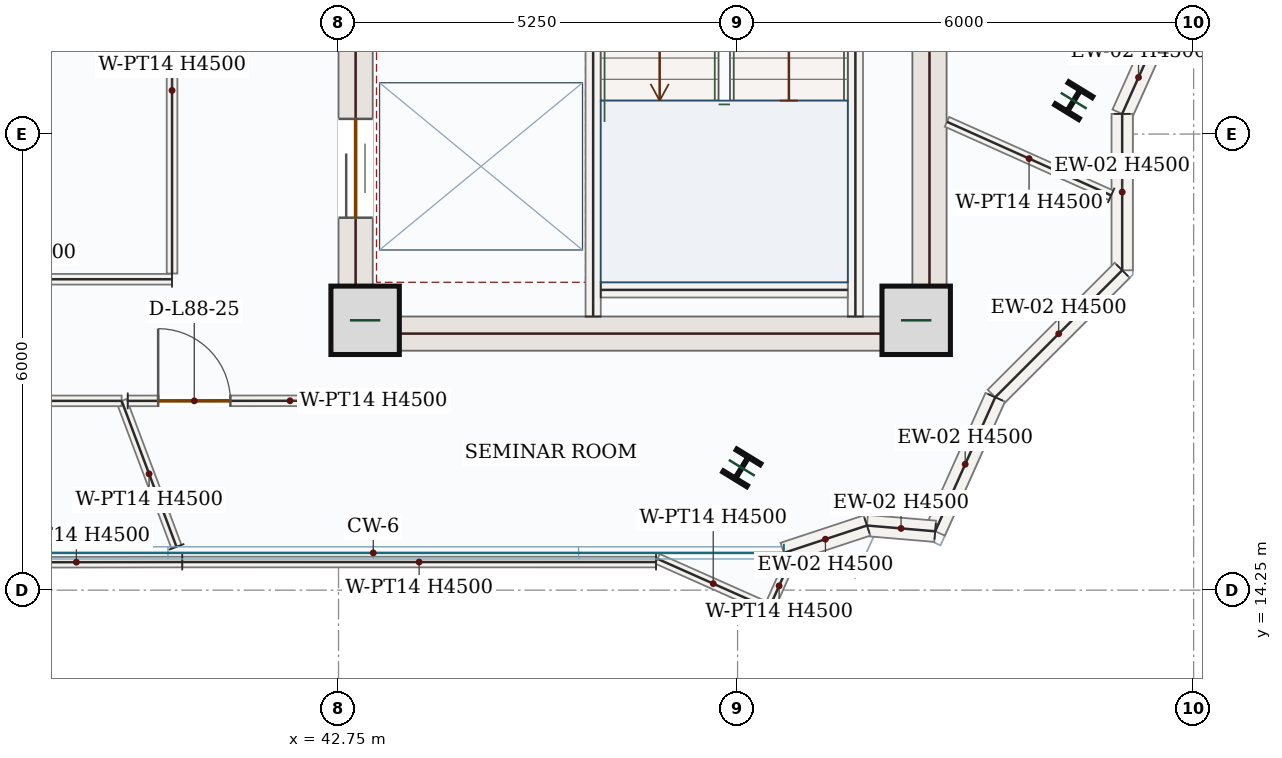
"""IFC4 building model, lengths in metres.
Left out: names, types, materials, properties, quantities, classifications, styles, units other than length and angle.
Written with IfcOpenShell. Run it as: python <this file> out.ifc"""

import sys

from ifc_helpers import new_model, si_unit, direction, frame, frame_2d, origin, origin_2d, place, context, subcontext, project, spatial, rectangle, i_section, extrude, source, transform, mapped, element, fill, save


model = new_model("IFC4")
c1 = context("Model", 3, precision=1e-05, world=origin(), true_north=direction((0.0, 1.0)))
c2 = subcontext(c1, "Body", "Model", "MODEL_VIEW")
j1 = project(units=[si_unit("LENGTHUNIT", "METRE"), si_unit("PLANEANGLEUNIT", "RADIAN")], contexts=[c1])
p1 = place(None, origin())
s1 = spatial("IfcSite", under=j1, at=p1, CompositionType="ELEMENT")
p2 = place(p1, origin())
s2 = spatial("IfcBuilding", under=s1, at=p2, CompositionType="ELEMENT")
p3 = place(p2, frame((0.0, 0.0, 361.05)))
s3 = spatial("IfcBuildingStorey", under=s2, at=p3, CompositionType="ELEMENT", Elevation=361.05)
p4 = place(p3, frame((42.975, 17.4, 0.0), z_axis=(0.0, 0.0, 1.0), x_axis=(0.0, 1.0, 0.0)))
e1 = element("IfcWall", 1, at=p4, inside=s3, PredefinedType="SHEAR", context=c2, shape_type="SweptSolid", body=[
    extrude(rectangle(XDim=8.55, YDim=0.45, at=frame_2d((4.275, 0.0))), origin(), (0.0, 0.0, 1.0), 4.5),
])
p5 = place(p4, frame((6.65, 0.0, 0.0)))
e2 = element("IfcOpeningElement", 2, at=p5, cuts=e1, PredefinedType="OPENING", context=c2, shape_type="SweptSolid", body=[
    extrude(rectangle(XDim=1.1, YDim=2.2, at=frame_2d((0.55, 1.1))), frame((0.0, 0.235, 0.0), z_axis=(0.0, -1.0, 0.0), x_axis=(1.0, 0.0, 0.0)), (0.0, 0.0, 1.0), 0.47),
])
p6 = place(p4, frame((1.75, 0.0, 0.0)))
e3 = element("IfcOpeningElement", 3, at=p6, cuts=e1, PredefinedType="OPENING", context=c2, shape_type="SweptSolid", body=[
    extrude(rectangle(XDim=1.3, YDim=2.2, at=frame_2d((0.65, 1.1))), frame((0.0, 0.235, 0.0), z_axis=(0.0, -1.0, 0.0), x_axis=(1.0, 0.0, 0.0)), (0.0, 0.0, 1.0), 0.47),
])
p7 = place(p4, frame((4.55, 0.0, 0.0)))
e4 = element("IfcOpeningElement", 4, at=p7, cuts=e1, PredefinedType="OPENING", context=c2, shape_type="SweptSolid", body=[
    extrude(rectangle(XDim=0.88, YDim=2.1, at=frame_2d((0.44, 1.05))), frame((0.0, 0.235, 0.0), z_axis=(0.0, -1.0, 0.0), x_axis=(1.0, 0.0, 0.0)), (0.0, 0.0, 1.0), 0.47),
])
m1 = source(origin(), c2, "Body", "SweptSolid", [
    extrude(rectangle(XDim=8.55, YDim=0.45, at=frame_2d((4.275, 0.0))), origin(), (0.0, 0.0, 1.0), 4.5),
])
p8 = place(p3, frame((50.525, 17.4, 0.0), z_axis=(0.0, 0.0, 1.0), x_axis=(0.0, 1.0, 0.0)))
e5 = element("IfcWall", 5, at=p8, inside=s3, PredefinedType="SHEAR", context=c2, shape_type="MappedRepresentation", body=[
    mapped(m1, transform((0.0, 0.0, 0.0), x_axis=(1.0, 0.0, 0.0), y_axis=(0.0, 1.0, 0.0), z_axis=(0.0, 0.0, 1.0), scale=1.0)),
])
m2 = source(origin(), c2, "Body", "SweptSolid", [
    extrude(rectangle(XDim=7.1, YDim=0.45, at=frame_2d((3.55, 0.0))), origin(), (0.0, 0.0, 1.0), 4.5),
])
p9 = place(p3, frame((43.2, 17.625, 0.0), z_axis=(0.0, 0.0, 1.0), x_axis=(1.0, 0.0, 0.0)))
e6 = element("IfcWall", 6, at=p9, inside=s3, PredefinedType="SHEAR", context=c2, shape_type="MappedRepresentation", body=[
    mapped(m2, transform((0.0, 0.0, 0.0), x_axis=(1.0, 0.0, 0.0), y_axis=(0.0, 1.0, 0.0), z_axis=(0.0, 0.0, 1.0), scale=1.0)),
])
m3 = source(origin(), c2, "Body", "SweptSolid", [
    extrude(rectangle(XDim=0.9, YDim=0.9, at=origin_2d()), origin(), (0.0, 0.0, 1.0), 4.8),
])
for number, where, z_axis, x_axis in (
    (7, (43.1, 17.8, 0.0), (0.0, 0.0, 1.0), (1.0, 0.0, 0.0)),
    (8, (50.35, 17.8, 0.0), (0.0, 0.0, 1.0), (1.0, 0.0, 0.0)),
):
    element("IfcColumn", number, at=place(p3, frame(where, z_axis=z_axis, x_axis=x_axis)), inside=s3, PredefinedType="COLUMN", context=c2, shape_type="MappedRepresentation", body=[
        mapped(m3, transform((0.0, 0.0, 0.0), x_axis=(1.0, 0.0, 0.0), y_axis=(0.0, 1.0, 0.0), z_axis=(0.0, 0.0, 1.0), scale=1.0)),
    ])
m4 = source(origin(), c2, "Body", "SweptSolid", [
    extrude(i_section(OverallWidth=0.369, OverallDepth=0.356, WebThickness=0.011, FlangeThickness=0.018, FilletRadius=0.018, at=origin_2d()), origin(), (0.0, 0.0, 1.0), 4.8),
])
for number, where, z_axis, x_axis in (
    (9, (48.055, 15.859, 0.0), (0.0, 0.0, 1.0), (-0.853, 0.522, 0.0)),
    (10, (52.423, 20.689, 0.0), (0.0, 0.0, 1.0), (-0.853, 0.522, 0.0)),
):
    element("IfcColumn", number, at=place(p3, frame(where, z_axis=z_axis, x_axis=x_axis)), inside=s3, PredefinedType="COLUMN", context=c2, shape_type="MappedRepresentation", body=[
        mapped(m4, transform((0.0, 0.0, 0.0), x_axis=(1.0, 0.0, 0.0), y_axis=(0.0, 1.0, 0.0), z_axis=(0.0, 0.0, 1.0), scale=1.0)),
    ])
p10 = place(p3, frame((54.656, 24.077, 0.0), z_axis=(0.0, 0.0, 1.0), x_axis=(-0.408847516138, -0.912602711232, 0.0)))
e11 = element("IfcWall", 11, at=p10, inside=s3, PredefinedType="SOLIDWALL", context=c2, shape_type="SweptSolid", body=[
    extrude(rectangle(XDim=3.902, YDim=0.28, at=frame_2d((1.951, 0.0))), origin(), (0.0, 0.0, 1.0), 4.5),
])
p11 = place(p10, frame((1.201, 0.0, 0.85)))
e12 = element("IfcOpeningElement", 12, at=p11, cuts=e11, PredefinedType="OPENING", context=c2, shape_type="SweptSolid", body=[
    extrude(rectangle(XDim=1.5, YDim=1.5, at=frame_2d((0.75, 0.75))), frame((0.0, 0.15, 0.0), z_axis=(0.0, -1.0, 0.0), x_axis=(1.0, 0.0, 0.0)), (0.0, 0.0, 1.0), 0.3),
])
m5 = source(origin(), c2, "Body", "SweptSolid", [
    extrude(rectangle(XDim=2.058, YDim=0.28, at=frame_2d((1.029, 0.0))), origin(), (0.0, 0.0, 1.0), 4.5),
])
p12 = place(p3, frame((53.06, 20.516, 0.0), z_axis=(0.0, 0.0, 1.0), x_axis=(0.0, -1.0, 0.0)))
e13 = element("IfcWall", 13, at=p12, inside=s3, PredefinedType="SOLIDWALL", context=c2, shape_type="MappedRepresentation", body=[
    mapped(m5, transform((0.0, 0.0, 0.0), x_axis=(1.0, 0.0, 0.0), y_axis=(0.0, 1.0, 0.0), z_axis=(0.0, 0.0, 1.0), scale=1.0)),
])
m6 = source(origin(), c2, "Body", "SweptSolid", [
    extrude(rectangle(XDim=2.362, YDim=0.28, at=frame_2d((1.181, 0.0))), origin(), (0.0, 0.0, 1.0), 4.5),
])
p13 = place(p3, frame((53.06, 18.458, 0.0), z_axis=(0.0, 0.0, 1.0), x_axis=(-0.707106781187, -0.707106781187, 0.0)))
e14 = element("IfcWall", 14, at=p13, inside=s3, PredefinedType="SOLIDWALL", context=c2, shape_type="MappedRepresentation", body=[
    mapped(m6, transform((0.0, 0.0, 0.0), x_axis=(1.0, 0.0, 0.0), y_axis=(0.0, 1.0, 0.0), z_axis=(0.0, 0.0, 1.0), scale=1.0)),
])
m7 = source(origin(), c2, "Body", "SweptSolid", [
    extrude(rectangle(XDim=1.932, YDim=0.28, at=frame_2d((0.966, 0.0))), origin(), (0.0, 0.0, 1.0), 4.5),
])
p14 = place(p3, frame((51.39, 16.788, 0.0), z_axis=(0.0, 0.0, 1.0), x_axis=(-0.408856367363, -0.912598745817, 0.0)))
e15 = element("IfcWall", 15, at=p14, inside=s3, PredefinedType="SOLIDWALL", context=c2, shape_type="MappedRepresentation", body=[
    mapped(m7, transform((0.0, 0.0, 0.0), x_axis=(1.0, 0.0, 0.0), y_axis=(0.0, 1.0, 0.0), z_axis=(0.0, 0.0, 1.0), scale=1.0)),
])
m8 = source(origin(), c2, "Body", "SweptSolid", [
    extrude(rectangle(XDim=0.9, YDim=0.28, at=frame_2d((0.45, 0.0))), origin(), (0.0, 0.0, 1.0), 4.5),
])
p15 = place(p3, frame((50.6, 15.024, 0.0), z_axis=(0.0, 0.0, 1.0), x_axis=(-0.996415533388, 0.084593645284, 0.0)))
e16 = element("IfcWall", 16, at=p15, inside=s3, PredefinedType="SOLIDWALL", context=c2, shape_type="MappedRepresentation", body=[
    mapped(m8, transform((0.0, 0.0, 0.0), x_axis=(1.0, 0.0, 0.0), y_axis=(0.0, 1.0, 0.0), z_axis=(0.0, 0.0, 1.0), scale=1.0)),
])
m9 = source(origin(), c2, "Body", "SweptSolid", [
    extrude(rectangle(XDim=1.151, YDim=0.28, at=frame_2d((0.575, 0.0))), origin(), (0.0, 0.0, 1.0), 4.5),
])
p16 = place(p3, frame((49.702, 15.1, 0.0), z_axis=(0.0, 0.0, 1.0), x_axis=(-0.949717622695, -0.313107708532, 0.0)))
e17 = element("IfcWall", 17, at=p16, inside=s3, PredefinedType="SOLIDWALL", context=c2, shape_type="MappedRepresentation", body=[
    mapped(m9, transform((0.0, 0.0, 0.0), x_axis=(1.0, 0.0, 0.0), y_axis=(0.0, 1.0, 0.0), z_axis=(0.0, 0.0, 1.0), scale=1.0)),
])
m10 = source(origin(), c2, "Body", "SweptSolid", [
    extrude(rectangle(XDim=7.87, YDim=0.2, at=frame_2d((3.935, 0.0))), origin(), (0.0, 0.0, 1.0), 4.5),
])
p17 = place(p3, frame((49.55, 17.85, 0.0), z_axis=(0.0, 0.0, 1.0), x_axis=(0.0, 1.0, 0.0)))
e18 = element("IfcWall", 18, at=p17, inside=s3, PredefinedType="SOLIDWALL", context=c2, shape_type="MappedRepresentation", body=[
    mapped(m10, transform((0.0, 0.0, 0.0), x_axis=(1.0, 0.0, 0.0), y_axis=(0.0, 1.0, 0.0), z_axis=(0.0, 0.0, 1.0), scale=1.0)),
])
p18 = place(p3, frame((46.1, 17.85, 0.0), z_axis=(0.0, 0.0, 1.0), x_axis=(0.0, 1.0, 0.0)))
e19 = element("IfcWall", 19, at=p18, inside=s3, PredefinedType="SOLIDWALL", context=c2, shape_type="SweptSolid", body=[
    extrude(rectangle(XDim=8.0, YDim=0.2, at=frame_2d((4.0, 0.0))), origin(), (0.0, 0.0, 1.0), 4.5),
])
p19 = place(p18, frame((6.3, 0.0, 0.0)))
e20 = element("IfcOpeningElement", 20, at=p19, cuts=e19, PredefinedType="OPENING", context=c2, shape_type="SweptSolid", body=[
    extrude(rectangle(XDim=1.05, YDim=2.15, at=frame_2d((0.525, 1.075))), frame((0.0, 0.11, 0.0), z_axis=(0.0, -1.0, 0.0), x_axis=(1.0, 0.0, 0.0)), (0.0, 0.0, 1.0), 0.22),
])
m11 = source(origin(), c2, "Body", "SweptSolid", [
    extrude(rectangle(XDim=3.25, YDim=0.2, at=frame_2d((1.625, 0.0))), origin(), (0.0, 0.0, 1.0), 4.5),
])
p20 = place(p3, frame((46.2, 18.2, 0.0), z_axis=(0.0, 0.0, 1.0), x_axis=(1.0, 0.0, 0.0)))
e21 = element("IfcWall", 21, at=p20, inside=s3, PredefinedType="SOLIDWALL", context=c2, shape_type="MappedRepresentation", body=[
    mapped(m11, transform((0.0, 0.0, 0.0), x_axis=(1.0, 0.0, 0.0), y_axis=(0.0, 1.0, 0.0), z_axis=(0.0, 0.0, 1.0), scale=1.0)),
])
m12 = source(origin(), c2, "Body", "SweptSolid", [
    extrude(rectangle(XDim=2.367, YDim=0.14, at=frame_2d((1.184, 0.0))), origin(), (0.0, 0.0, 1.0), 4.5),
])
p21 = place(p3, frame((52.915, 19.444, 0.0), z_axis=(0.0, 0.0, 1.0), x_axis=(-0.912599576991, 0.408854512115, 0.0)))
e22 = element("IfcWall", 22, at=p21, inside=s3, PredefinedType="PARTITIONING", context=c2, shape_type="MappedRepresentation", body=[
    mapped(m12, transform((0.0, 0.0, 0.0), x_axis=(1.0, 0.0, 0.0), y_axis=(0.0, 1.0, 0.0), z_axis=(0.0, 0.0, 1.0), scale=1.0)),
])
m13 = source(origin(), c2, "Body", "SweptSolid", [
    extrude(rectangle(XDim=2.051, YDim=0.14, at=frame_2d((1.025, 0.0))), origin(), (0.0, 0.0, 1.0), 4.5),
])
p22 = place(p3, frame((40.618, 14.82, 0.0), z_axis=(0.0, 0.0, 1.0), x_axis=(-0.35174952174, 0.936094158702, 0.0)))
e23 = element("IfcWall", 23, at=p22, inside=s3, PredefinedType="PARTITIONING", context=c2, shape_type="MappedRepresentation", body=[
    mapped(m13, transform((0.0, 0.0, 0.0), x_axis=(1.0, 0.0, 0.0), y_axis=(0.0, 1.0, 0.0), z_axis=(0.0, 0.0, 1.0), scale=1.0)),
])
p23 = place(p3, frame((39.977, 16.74, 0.0), z_axis=(0.0, 0.0, 1.0), x_axis=(0.999999902865, 0.000440761593, 0.0)))
e24 = element("IfcWall", 24, at=p23, inside=s3, PredefinedType="PARTITIONING", context=c2, shape_type="SweptSolid", body=[
    extrude(rectangle(XDim=2.77, YDim=0.14, at=frame_2d((1.385, 0.0))), origin(), (0.0, 0.0, 1.0), 4.5),
])
p24 = place(p23, frame((0.4, 0.0, 0.0)))
e25 = element("IfcOpeningElement", 25, at=p24, cuts=e24, PredefinedType="OPENING", context=c2, shape_type="SweptSolid", body=[
    extrude(rectangle(XDim=0.95, YDim=2.15, at=frame_2d((0.475, 1.075))), frame((0.0, 0.08, 0.0), z_axis=(0.0, -1.0, 0.0), x_axis=(1.0, 0.0, 0.0)), (0.0, 0.0, 1.0), 0.16),
])
m14 = source(origin(), c2, "Body", "SweptSolid", [
    extrude(rectangle(XDim=0.65, YDim=0.14, at=frame_2d((0.325, 0.0))), origin(), (0.0, 0.0, 1.0), 4.5),
])
p25 = place(p3, frame((48.679, 14.603, 0.0), z_axis=(0.0, 0.0, 1.0), x_axis=(-0.40881875169, -0.912615597208, 0.0)))
e26 = element("IfcWall", 26, at=p25, inside=s3, PredefinedType="PARTITIONING", context=c2, shape_type="MappedRepresentation", body=[
    mapped(m14, transform((0.0, 0.0, 0.0), x_axis=(1.0, 0.0, 0.0), y_axis=(0.0, 1.0, 0.0), z_axis=(0.0, 0.0, 1.0), scale=1.0)),
])
m15 = source(origin(), c2, "Body", "SweptSolid", [
    extrude(rectangle(XDim=1.606, YDim=0.14, at=frame_2d((0.803, 0.0))), origin(), (0.0, 0.0, 1.0), 4.5),
])
p26 = place(p3, frame((48.414, 14.009, 0.0), z_axis=(0.0, 0.0, 1.0), x_axis=(-0.913673598799, 0.406448711227, 0.0)))
e27 = element("IfcWall", 27, at=p26, inside=s3, PredefinedType="PARTITIONING", context=c2, shape_type="MappedRepresentation", body=[
    mapped(m15, transform((0.0, 0.0, 0.0), x_axis=(1.0, 0.0, 0.0), y_axis=(0.0, 1.0, 0.0), z_axis=(0.0, 0.0, 1.0), scale=1.0)),
])
m16 = source(origin(), c2, "Body", "SweptSolid", [
    extrude(rectangle(XDim=6.234, YDim=0.14, at=frame_2d((3.117, 0.0))), origin(), (0.0, 0.0, 1.0), 4.5),
])
p27 = place(p3, frame((46.927, 14.62, 0.0), z_axis=(0.0, 0.0, 1.0), x_axis=(-0.999999996932, 7.8330004e-05, 0.0)))
e28 = element("IfcWall", 28, at=p27, inside=s3, PredefinedType="PARTITIONING", context=c2, shape_type="MappedRepresentation", body=[
    mapped(m16, transform((0.0, 0.0, 0.0), x_axis=(1.0, 0.0, 0.0), y_axis=(0.0, 1.0, 0.0), z_axis=(0.0, 0.0, 1.0), scale=1.0)),
])
m17 = source(origin(), c2, "Body", "SweptSolid", [
    extrude(rectangle(XDim=4.47, YDim=0.14, at=frame_2d((2.235, 0.0))), origin(), (0.0, 0.0, 1.0), 4.5),
])
p28 = place(p3, frame((40.56, 18.34, 0.0), z_axis=(0.0, 0.0, 1.0), x_axis=(-1.0, 0.0, 0.0)))
e29 = element("IfcWall", 29, at=p28, inside=s3, PredefinedType="PARTITIONING", context=c2, shape_type="MappedRepresentation", body=[
    mapped(m17, transform((0.0, 0.0, 0.0), x_axis=(1.0, 0.0, 0.0), y_axis=(0.0, 1.0, 0.0), z_axis=(0.0, 0.0, 1.0), scale=1.0)),
])
p29 = place(p3, frame((40.56, 25.735, 0.0), z_axis=(0.0, 0.0, 1.0), x_axis=(0.0, -1.0, 0.0)))
e30 = element("IfcWall", 30, at=p29, inside=s3, PredefinedType="PARTITIONING", context=c2, shape_type="SweptSolid", body=[
    extrude(rectangle(XDim=7.32, YDim=0.14, at=frame_2d((3.66, 0.0))), origin(), (0.0, 0.0, 1.0), 4.5),
])
p30 = place(p29, frame((1.401, 0.0, 0.0)))
e31 = element("IfcOpeningElement", 31, at=p30, cuts=e30, PredefinedType="OPENING", context=c2, shape_type="SweptSolid", body=[
    extrude(rectangle(XDim=0.95, YDim=2.15, at=frame_2d((0.475, 1.075))), frame((0.0, 0.08, 0.0), z_axis=(0.0, -1.0, 0.0), x_axis=(1.0, 0.0, 0.0)), (0.0, 0.0, 1.0), 0.16),
])
p31 = place(p3, frame((31.425, 16.74, 0.0), z_axis=(0.0, 0.0, 1.0), x_axis=(1.0, 0.0, 0.0)))
e32 = element("IfcWall", 32, at=p31, inside=s3, PredefinedType="PARTITIONING", context=c2, shape_type="SweptSolid", body=[
    extrude(rectangle(XDim=8.472, YDim=0.14, at=frame_2d((4.236, 0.0))), origin(), (0.0, 0.0, 1.0), 4.5),
])
p32 = place(p31, frame((3.761, 0.0, 0.0)))
e33 = element("IfcOpeningElement", 33, at=p32, cuts=e32, PredefinedType="OPENING", context=c2, shape_type="SweptSolid", body=[
    extrude(rectangle(XDim=0.95, YDim=2.15, at=frame_2d((0.475, 1.075))), frame((0.0, 0.08, 0.0), z_axis=(0.0, -1.0, 0.0), x_axis=(1.0, 0.0, 0.0)), (0.0, 0.0, 1.0), 0.16),
])
m18 = source(origin(), c2, "Body", "SweptSolid", [
    extrude(rectangle(XDim=2.785, YDim=0.14, at=frame_2d((1.393, 0.0))), origin(), (0.0, 0.0, 1.0), 4.5),
])
p33 = place(p3, frame((40.694, 14.62, 0.0), z_axis=(0.0, 0.0, 1.0), x_axis=(-0.999998755431, -0.001577699851, 0.0)))
e34 = element("IfcWall", 34, at=p33, inside=s3, PredefinedType="PARTITIONING", context=c2, shape_type="MappedRepresentation", body=[
    mapped(m18, transform((0.0, 0.0, 0.0), x_axis=(1.0, 0.0, 0.0), y_axis=(0.0, 1.0, 0.0), z_axis=(0.0, 0.0, 1.0), scale=1.0)),
])
m19 = source(origin(), c2, "Body", "SweptSolid", [
    extrude(rectangle(XDim=1.3, YDim=2.2, at=frame_2d((0.65, 1.1))), frame((0.0, 0.025, 0.0), z_axis=(0.0, -1.0, 0.0), x_axis=(1.0, 0.0, 0.0)), (0.0, 0.0, 1.0), 0.05),
])
p34 = place(p6, origin())
e35 = element("IfcDoor", 35, at=p34, inside=s3, OperationType="DOUBLE_DOOR_SLIDING", PredefinedType="DOOR", context=c2, shape_type="MappedRepresentation", body=[
    mapped(m19, transform((0.0, 0.0, 0.0), x_axis=(1.0, 0.0, 0.0), y_axis=(0.0, 1.0, 0.0), z_axis=(0.0, 0.0, 1.0), scale=1.0)),
])
fill(e3, e35)
m20 = source(origin(), c2, "Body", "SweptSolid", [
    extrude(rectangle(XDim=0.95, YDim=2.15, at=frame_2d((0.475, 1.075))), frame((0.0, 0.025, 0.0), z_axis=(0.0, -1.0, 0.0), x_axis=(1.0, 0.0, 0.0)), (0.0, 0.0, 1.0), 0.05),
])
p35 = place(p24, origin())
e36 = element("IfcDoor", 36, at=p35, inside=s3, OperationType="SINGLE_SWING_LEFT", PredefinedType="DOOR", context=c2, shape_type="MappedRepresentation", body=[
    mapped(m20, transform((0.0, 0.0, 0.0), x_axis=(1.0, 0.0, 0.0), y_axis=(0.0, 1.0, 0.0), z_axis=(0.0, 0.0, 1.0), scale=1.0)),
])
fill(e25, e36)
save(model, sys.argv[1])
